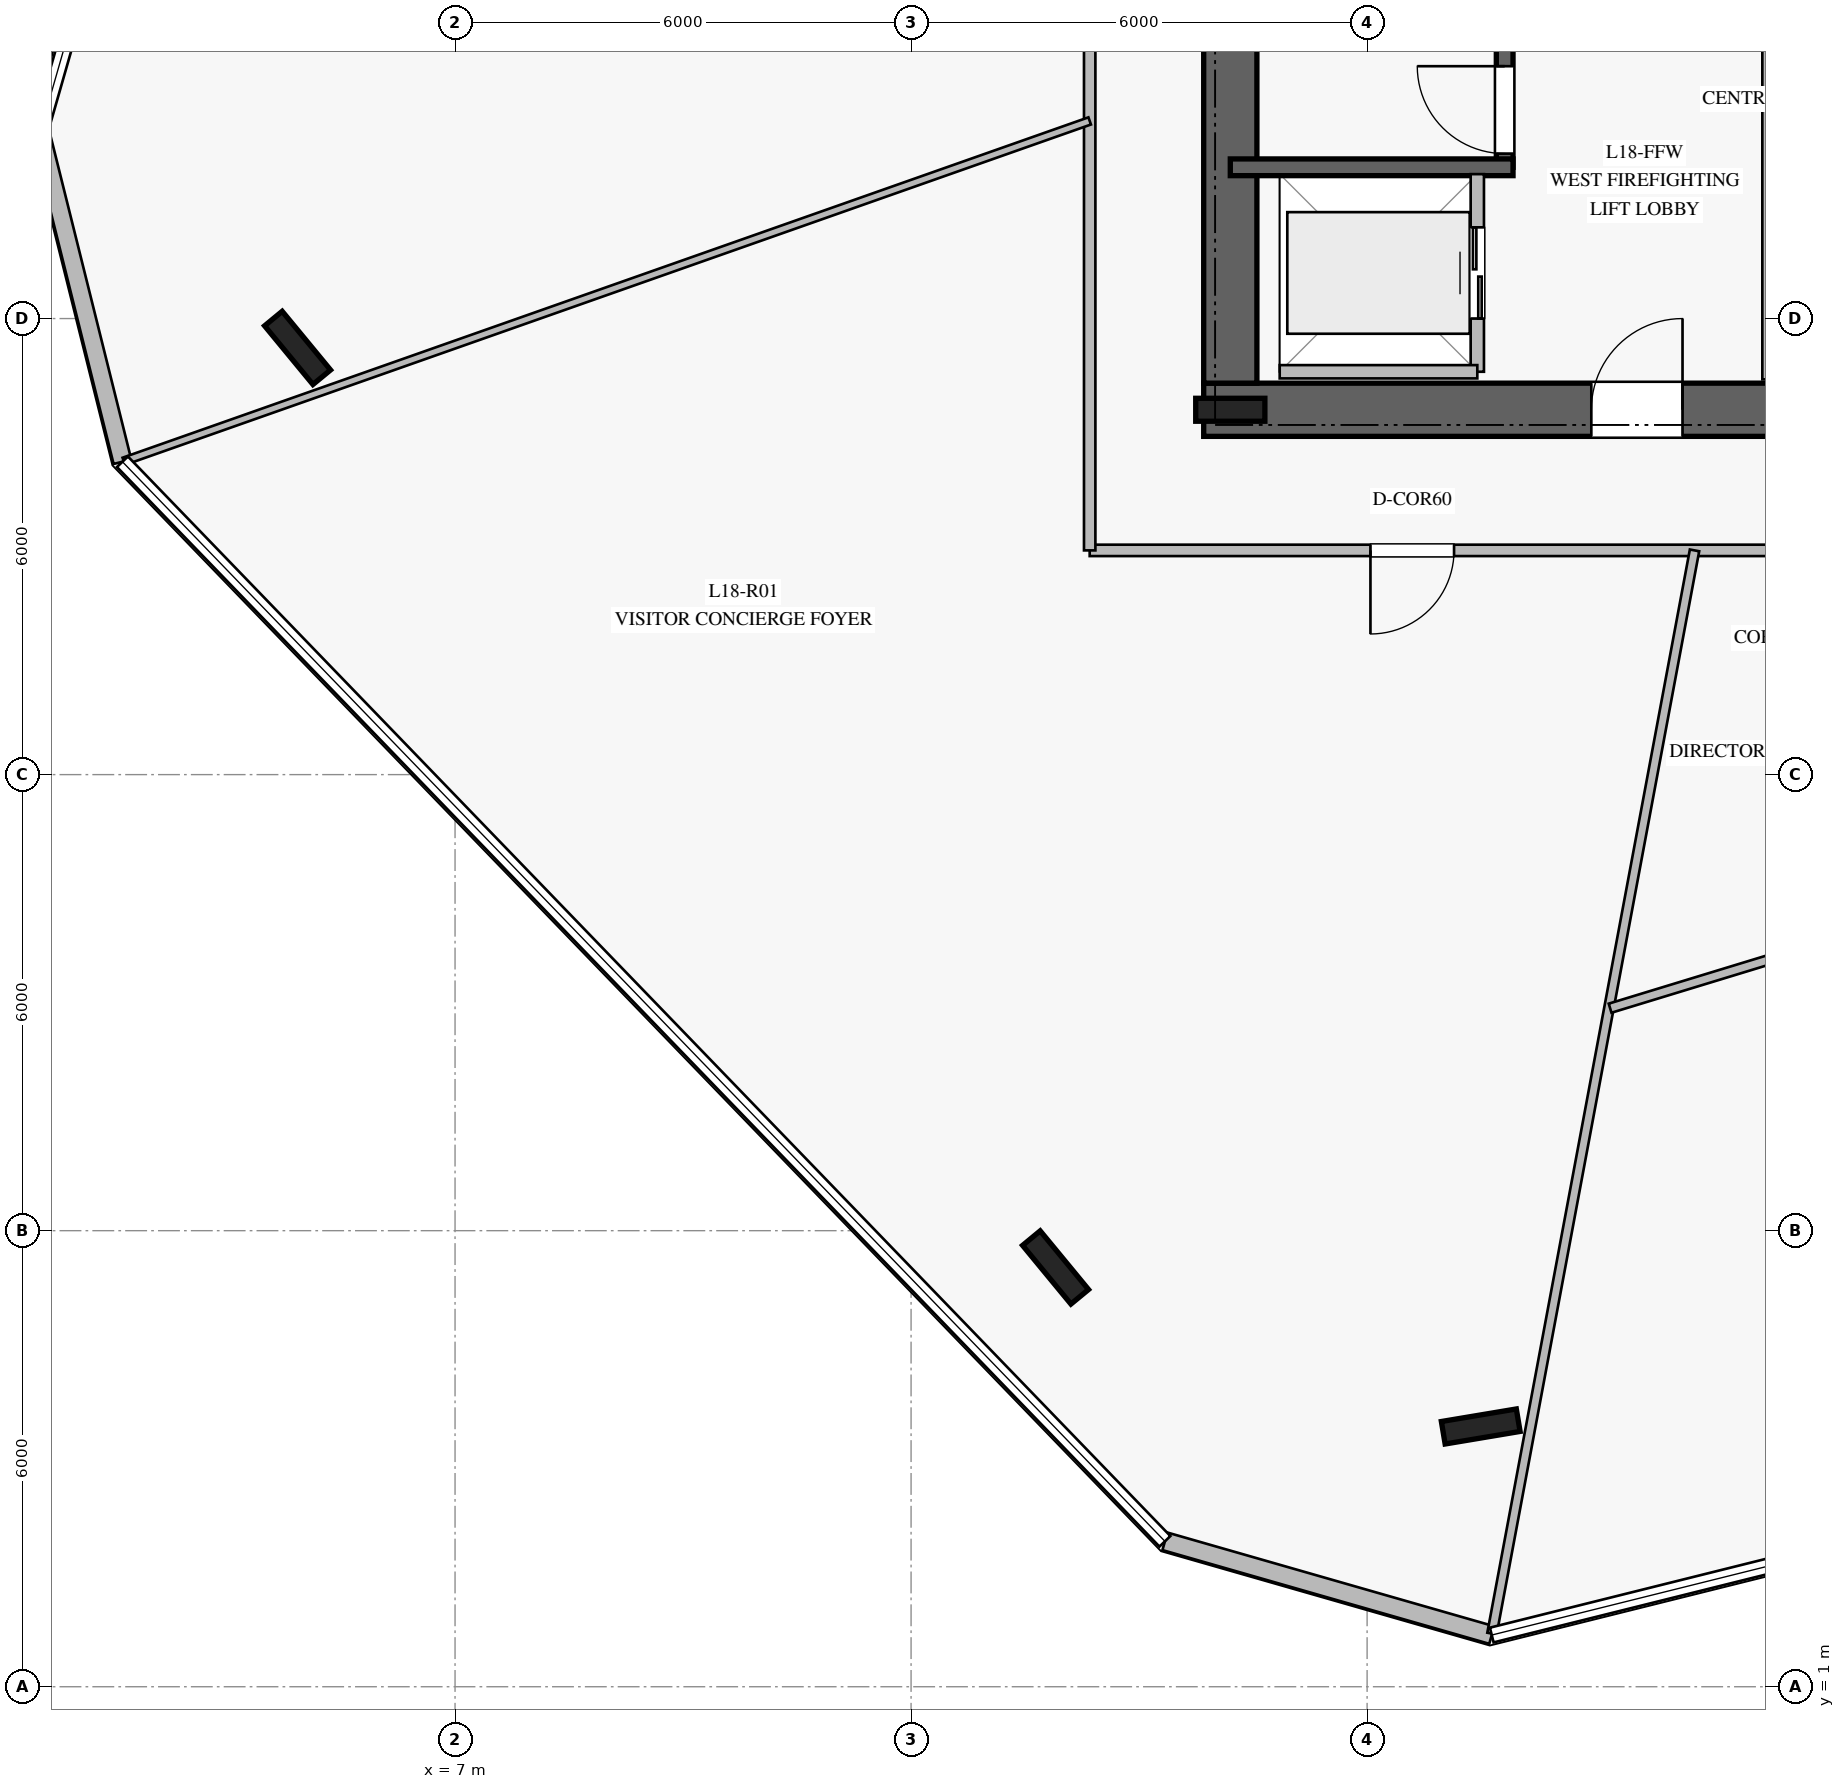
"""IFC4 building model, lengths in metres.
Left out: names, types, materials, properties, quantities, classifications, styles, units other than length and angle.
Written with IfcOpenShell. Run it as: python <this file> out.ifc"""

import sys

from ifc_helpers import new_model, si_unit, direction, frame, frame_2d, origin, origin_2d, place, context, subcontext, project, spatial, rectangle, i_section, extrude, element, fill, save


model = new_model("IFC4")
c1 = context("Model", 3, precision=1e-05, world=origin(), true_north=direction((0.0, 1.0)))
c2 = subcontext(c1, "Body", "Model", "MODEL_VIEW")
j1 = project(units=[si_unit("LENGTHUNIT", "METRE"), si_unit("PLANEANGLEUNIT", "RADIAN")], contexts=[c1])
p1 = place(None, origin())
s1 = spatial("IfcSite", under=j1, at=p1, CompositionType="ELEMENT")
p2 = place(p1, origin())
s2 = spatial("IfcBuilding", under=s1, at=p2, CompositionType="ELEMENT")
p3 = place(p2, frame((0.0, 0.0, 76.0)))
s3 = spatial("IfcBuildingStorey", under=s2, at=p3, CompositionType="ELEMENT", Elevation=76.0)
p4 = place(p3, frame((16.85, 17.8, 0.0), z_axis=(0.0, 0.0, 1.0), x_axis=(1.0, 0.0, 0.0)))
e1 = element("IfcWall", 1, at=p4, inside=s3, PredefinedType="SHEAR", context=c2, shape_type="SweptSolid", body=[
    extrude(rectangle(XDim=16.3, YDim=0.7, at=frame_2d((8.15, 0.0))), origin(), (0.0, 0.0, 1.0), 3.76),
])
p5 = place(p4, frame((5.1, 0.0, 0.0)))
e2 = element("IfcOpeningElement", 2, at=p5, cuts=e1, PredefinedType="OPENING", context=c2, shape_type="SweptSolid", body=[
    extrude(rectangle(XDim=1.2, YDim=2.25, at=frame_2d((0.6, 1.125))), frame((0.0, 0.36, 0.0), z_axis=(0.0, -1.0, 0.0), x_axis=(1.0, 0.0, 0.0)), (0.0, 0.0, 1.0), 0.72),
])
p6 = place(p4, frame((14.05, 0.0, 0.0)))
e3 = element("IfcOpeningElement", 3, at=p6, cuts=e1, PredefinedType="OPENING", context=c2, shape_type="SweptSolid", body=[
    extrude(rectangle(XDim=0.9, YDim=2.1, at=frame_2d((0.45, 1.05))), frame((0.0, 0.36, 0.0), z_axis=(0.0, -1.0, 0.0), x_axis=(1.0, 0.0, 0.0)), (0.0, 0.0, 1.0), 0.72),
])
p7 = place(p4, frame((7.95, 0.0, 0.0)))
e4 = element("IfcOpeningElement", 4, at=p7, cuts=e1, PredefinedType="OPENING", context=c2, shape_type="SweptSolid", body=[
    extrude(rectangle(XDim=1.1, YDim=2.2, at=frame_2d((0.55, 1.1))), frame((0.0, 0.36, 0.0), z_axis=(0.0, -1.0, 0.0), x_axis=(1.0, 0.0, 0.0)), (0.0, 0.0, 1.0), 0.72),
])
p8 = place(p4, frame((9.925, 0.0, 0.0)))
e5 = element("IfcOpeningElement", 5, at=p8, cuts=e1, PredefinedType="OPENING", context=c2, shape_type="SweptSolid", body=[
    extrude(rectangle(XDim=1.1, YDim=2.2, at=frame_2d((0.55, 1.1))), frame((0.0, 0.36, 0.0), z_axis=(0.0, -1.0, 0.0), x_axis=(1.0, 0.0, 0.0)), (0.0, 0.0, 1.0), 0.72),
])
p9 = place(p4, frame((11.9, 0.0, 0.0)))
e6 = element("IfcOpeningElement", 6, at=p9, cuts=e1, PredefinedType="OPENING", context=c2, shape_type="SweptSolid", body=[
    extrude(rectangle(XDim=1.1, YDim=2.2, at=frame_2d((0.55, 1.1))), frame((0.0, 0.36, 0.0), z_axis=(0.0, -1.0, 0.0), x_axis=(1.0, 0.0, 0.0)), (0.0, 0.0, 1.0), 0.72),
])
p10 = place(p3, frame((17.2, 31.85, 0.0), z_axis=(0.0, 0.0, 1.0), x_axis=(0.0, -1.0, 0.0)))
e7 = element("IfcWall", 7, at=p10, inside=s3, PredefinedType="SHEAR", context=c2, shape_type="SweptSolid", body=[
    extrude(rectangle(XDim=13.7, YDim=0.7, at=frame_2d((6.85, 0.0))), origin(), (0.0, 0.0, 1.0), 3.76),
])
p11 = place(p10, frame((2.0, 0.0, 0.0)))
e8 = element("IfcOpeningElement", 8, at=p11, cuts=e7, PredefinedType="OPENING", context=c2, shape_type="SweptSolid", body=[
    extrude(rectangle(XDim=1.5, YDim=2.2, at=frame_2d((0.75, 1.1))), frame((0.0, 0.36, 0.0), z_axis=(0.0, -1.0, 0.0), x_axis=(1.0, 0.0, 0.0)), (0.0, 0.0, 1.0), 0.72),
])
p12 = place(p3, frame((17.2, 17.8, 0.0), z_axis=(0.0, 0.0, 1.0), x_axis=(1.0, 0.0, 0.0)))
e9 = element("IfcColumn", 9, at=p12, inside=s3, PredefinedType="COLUMN", context=c2, shape_type="SweptSolid", body=[
    extrude(i_section(OverallWidth=0.302, OverallDepth=0.91, WebThickness=0.021, FlangeThickness=0.04, at=origin_2d()), origin(), (0.0, 0.0, 1.0), 4.0),
])
p13 = place(p3, frame((20.81, 20.99, 0.0), z_axis=(0.0, 0.0, 1.0), x_axis=(0.0, 1.0, 0.0)))
e10 = element("IfcWall", 10, at=p13, inside=s3, PredefinedType="SOLIDWALL", context=c2, shape_type="SweptSolid", body=[
    extrude(rectangle(XDim=7.22, YDim=0.22, at=frame_2d((3.61, 0.0))), origin(), (0.0, 0.0, 1.0), 3.76),
])
p14 = place(p13, frame((0.18, 0.0, 0.0)))
e11 = element("IfcOpeningElement", 11, at=p14, cuts=e10, PredefinedType="OPENING", context=c2, shape_type="SweptSolid", body=[
    extrude(rectangle(XDim=1.15, YDim=2.2, at=frame_2d((0.575, 1.1))), frame((0.0, 0.12, 0.0), z_axis=(0.0, -1.0, 0.0), x_axis=(1.0, 0.0, 0.0)), (0.0, 0.0, 1.0), 0.24),
])
p15 = place(p3, frame((17.2, 20.99, 0.0), z_axis=(0.0, 0.0, 1.0), x_axis=(1.0, 0.0, 0.0)))
e12 = element("IfcWall", 12, at=p15, inside=s3, PredefinedType="SOLIDWALL", context=c2, shape_type="SweptSolid", body=[
    extrude(rectangle(XDim=3.72, YDim=0.22, at=frame_2d((1.86, 0.0))), origin(), (0.0, 0.0, 1.0), 3.76),
])
for number, where, z_axis, x_axis in (
    (13, (4.928, 18.614, 0.0), (0.0, 0.0, 1.0), (-0.636, 0.772, 0.0)),
    (14, (14.901, 6.516, 0.0), (0.0, 0.0, 1.0), (-0.636, 0.772, 0.0)),
    (15, (20.495, 4.424, 0.0), (0.0, 0.0, 1.0), (0.986, 0.165, 0.0)),
):
    element("IfcColumn", number, at=place(p3, frame(where, z_axis=z_axis, x_axis=x_axis)), inside=s3, PredefinedType="COLUMN", context=c2, shape_type="SweptSolid", body=[
        extrude(i_section(OverallWidth=0.3, OverallDepth=1.0, WebThickness=0.019, FlangeThickness=0.036, at=origin_2d()), origin(), (0.0, 0.0, 1.0), 4.0),
    ])
p16 = place(p3, frame((1.541, 21.457, 0.0), z_axis=(0.0, 0.0, 1.0), x_axis=(0.242060539471, -0.970261147955, 0.0)))
e16 = element("IfcWall", 16, at=p16, inside=s3, PredefinedType="STANDARD", context=c2, shape_type="SweptSolid", body=[
    extrude(rectangle(XDim=4.474, YDim=0.24, at=frame_2d((2.237, 0.0))), origin(), (0.0, 0.0, 1.0), 3.76),
])
p17 = place(p3, frame((16.34, 2.913, 0.0), z_axis=(0.0, 0.0, 1.0), x_axis=(0.96124954367, -0.275679732289, 0.0)))
e17 = element("IfcWall", 17, at=p17, inside=s3, PredefinedType="STANDARD", context=c2, shape_type="SweptSolid", body=[
    extrude(rectangle(XDim=4.473, YDim=0.24, at=frame_2d((2.237, 0.0))), origin(), (0.0, 0.0, 1.0), 3.76),
])
p18 = place(p3, frame((24.3, 18.2, 0.0), z_axis=(0.0, 0.0, 1.0), x_axis=(0.0, 1.0, 0.0)))
e18 = element("IfcWall", 18, at=p18, inside=s3, PredefinedType="PARTITIONING", context=c2, shape_type="SweptSolid", body=[
    extrude(rectangle(XDim=5.15, YDim=0.2, at=frame_2d((2.575, 0.0))), origin(), (0.0, 0.0, 1.0), 3.76),
])
p19 = place(p3, frame((20.45, 18.3, 0.0), z_axis=(0.0, 0.0, 1.0), x_axis=(0.0, 1.0, 0.0)))
e19 = element("IfcWall", 19, at=p19, inside=s3, PredefinedType="PARTITIONING", context=c2, shape_type="SweptSolid", body=[
    extrude(rectangle(XDim=2.6, YDim=0.175, at=frame_2d((1.3, 0.0))), origin(), (0.0, 0.0, 1.0), 3.76),
])
p20 = place(p19, frame((0.7, 0.0, 0.0)))
e20 = element("IfcOpeningElement", 20, at=p20, cuts=e19, PredefinedType="OPENING", context=c2, shape_type="SweptSolid", body=[
    extrude(rectangle(XDim=1.2, YDim=2.2, at=frame_2d((0.6, 1.1))), frame((0.0, 0.098, 0.0), z_axis=(0.0, -1.0, 0.0), x_axis=(1.0, 0.0, 0.0)), (0.0, 0.0, 1.0), 0.195),
])
p21 = place(p3, frame((17.85, 18.3, 0.0), z_axis=(0.0, 0.0, 1.0), x_axis=(1.0, 0.0, 0.0)))
e21 = element("IfcWall", 21, at=p21, inside=s3, PredefinedType="PARTITIONING", context=c2, shape_type="SweptSolid", body=[
    extrude(rectangle(XDim=2.6, YDim=0.175, at=frame_2d((1.3, 0.0))), origin(), (0.0, 0.0, 1.0), 3.76),
])
p22 = place(p3, frame((34.65, 15.95, 0.0), z_axis=(0.0, 0.0, 1.0), x_axis=(-1.0, 0.0, 0.0)))
e22 = element("IfcWall", 22, at=p22, inside=s3, PredefinedType="PARTITIONING", context=c2, shape_type="SweptSolid", body=[
    extrude(rectangle(XDim=19.3, YDim=0.15, at=frame_2d((9.65, 0.0))), origin(), (0.0, 0.0, 1.0), 3.21),
])
p23 = place(p22, frame((14.506, 0.0, 0.0)))
e23 = element("IfcOpeningElement", 23, at=p23, cuts=e22, PredefinedType="OPENING", context=c2, shape_type="SweptSolid", body=[
    extrude(rectangle(XDim=1.1, YDim=2.2, at=frame_2d((0.55, 1.1))), frame((0.0, 0.085, 0.0), z_axis=(0.0, -1.0, 0.0), x_axis=(1.0, 0.0, 0.0)), (0.0, 0.0, 1.0), 0.17),
])
p24 = place(p22, frame((6.218, 0.0, 0.0)))
e24 = element("IfcOpeningElement", 24, at=p24, cuts=e22, PredefinedType="OPENING", context=c2, shape_type="SweptSolid", body=[
    extrude(rectangle(XDim=1.1, YDim=2.2, at=frame_2d((0.55, 1.1))), frame((0.0, 0.085, 0.0), z_axis=(0.0, -1.0, 0.0), x_axis=(1.0, 0.0, 0.0)), (0.0, 0.0, 1.0), 0.17),
])
p25 = place(p3, frame((15.35, 15.95, 0.0), z_axis=(0.0, 0.0, 1.0), x_axis=(0.0, 1.0, 0.0)))
e25 = element("IfcWall", 25, at=p25, inside=s3, PredefinedType="PARTITIONING", context=c2, shape_type="SweptSolid", body=[
    extrude(rectangle(XDim=18.1, YDim=0.15, at=frame_2d((9.05, 0.0))), origin(), (0.0, 0.0, 1.0), 3.21),
])
p26 = place(p25, frame((9.381, 0.0, 0.0)))
e26 = element("IfcOpeningElement", 26, at=p26, cuts=e25, PredefinedType="OPENING", context=c2, shape_type="SweptSolid", body=[
    extrude(rectangle(XDim=1.1, YDim=2.2, at=frame_2d((0.55, 1.1))), frame((0.0, 0.085, 0.0), z_axis=(0.0, -1.0, 0.0), x_axis=(1.0, 0.0, 0.0)), (0.0, 0.0, 1.0), 0.17),
])
p27 = place(p3, frame((15.35, 21.6, 0.0), z_axis=(0.0, 0.0, 1.0), x_axis=(-0.943156803456, -0.332348076712, 0.0)))
e27 = element("IfcWall", 27, at=p27, inside=s3, PredefinedType="MOVABLE", context=c2, shape_type="SweptSolid", body=[
    extrude(rectangle(XDim=13.474, YDim=0.1, at=frame_2d((6.737, 0.0))), origin(), (0.0, 0.0, 1.0), 3.06),
])
p28 = place(p3, frame((23.308, 15.95, 0.0), z_axis=(0.0, 0.0, 1.0), x_axis=(-0.183820818774, -0.982959768549, 0.0)))
e28 = element("IfcWall", 28, at=p28, inside=s3, PredefinedType="PARTITIONING", context=c2, shape_type="SweptSolid", body=[
    extrude(rectangle(XDim=14.498, YDim=0.125, at=frame_2d((7.249, 0.0))), origin(), (0.0, 0.0, 1.0), 3.06),
])
p29 = place(p3, frame((22.197, 9.927, 0.0), z_axis=(0.0, 0.0, 1.0), x_axis=(0.956509687219, 0.291700562659, 0.0)))
e29 = element("IfcWall", 29, at=p29, inside=s3, PredefinedType="PARTITIONING", context=c2, shape_type="SweptSolid", body=[
    extrude(rectangle(XDim=12.455, YDim=0.125, at=frame_2d((6.228, 0.0))), origin(), (0.0, 0.0, 1.0), 3.21),
])
p30 = place(p29, frame((5.727, 0.0, 0.0)))
e30 = element("IfcOpeningElement", 30, at=p30, cuts=e29, PredefinedType="OPENING", context=c2, shape_type="SweptSolid", body=[
    extrude(rectangle(XDim=1.0, YDim=2.15, at=frame_2d((0.5, 1.075))), frame((0.0, 0.073, 0.0), z_axis=(0.0, -1.0, 0.0), x_axis=(1.0, 0.0, 0.0)), (0.0, 0.0, 1.0), 0.145),
])
p31 = place(p14, origin())
e31 = element("IfcDoor", 31, at=p31, inside=s3, OperationType="SINGLE_SWING_RIGHT", PredefinedType="DOOR", context=c2, shape_type="SweptSolid", body=[
    extrude(rectangle(XDim=1.15, YDim=2.2, at=frame_2d((0.575, 1.1))), frame((0.0, 0.025, 0.0), z_axis=(0.0, -1.0, 0.0), x_axis=(1.0, 0.0, 0.0)), (0.0, 0.0, 1.0), 0.05),
])
fill(e11, e31)
p32 = place(p5, origin())
e32 = element("IfcDoor", 32, at=p32, inside=s3, OperationType="SINGLE_SWING_RIGHT", PredefinedType="DOOR", context=c2, shape_type="SweptSolid", body=[
    extrude(rectangle(XDim=1.2, YDim=2.25, at=frame_2d((0.6, 1.125))), frame((0.0, 0.025, 0.0), z_axis=(0.0, -1.0, 0.0), x_axis=(1.0, 0.0, 0.0)), (0.0, 0.0, 1.0), 0.05),
])
fill(e2, e32)
p33 = place(p20, origin())
e33 = element("IfcDoor", 33, at=p33, inside=s3, OperationType="DOUBLE_DOOR_SLIDING", PredefinedType="DOOR", context=c2, shape_type="SweptSolid", body=[
    extrude(rectangle(XDim=1.2, YDim=2.2, at=frame_2d((0.6, 1.1))), frame((0.0, 0.025, 0.0), z_axis=(0.0, -1.0, 0.0), x_axis=(1.0, 0.0, 0.0)), (0.0, 0.0, 1.0), 0.05),
])
fill(e20, e33)
p34 = place(p23, origin())
e34 = element("IfcDoor", 34, at=p34, inside=s3, OperationType="SINGLE_SWING_RIGHT", PredefinedType="DOOR", context=c2, shape_type="SweptSolid", body=[
    extrude(rectangle(XDim=1.1, YDim=2.2, at=frame_2d((0.55, 1.1))), frame((0.0, 0.025, 0.0), z_axis=(0.0, -1.0, 0.0), x_axis=(1.0, 0.0, 0.0)), (0.0, 0.0, 1.0), 0.05),
])
fill(e23, e34)
save(model, sys.argv[1])
